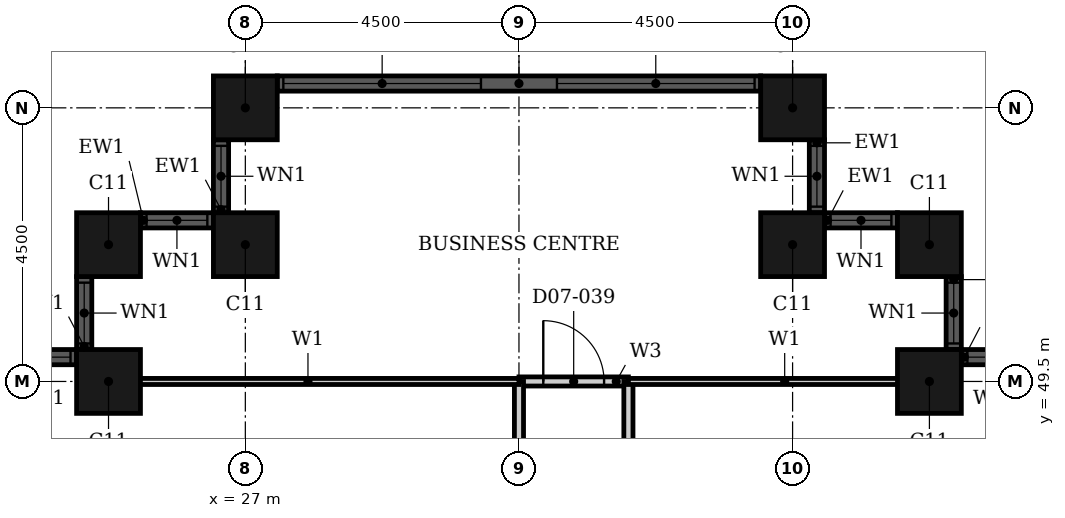
"""IFC4 building model, lengths in metres.
Left out: names, types, materials, properties, quantities, classifications, styles, units other than length and angle.
Written with IfcOpenShell. Run it as: python <this file> out.ifc"""

import sys

from ifc_helpers import new_model, si_unit, direction, frame, frame_2d, origin, origin_2d, place, context, subcontext, project, spatial, rectangle, hollow_rectangle, extrude, element, fill, save


model = new_model("IFC4")
c1 = context("Model", 3, precision=1e-05, world=origin(), true_north=direction((0.0, 1.0)))
c2 = subcontext(c1, "Body", "Model", "MODEL_VIEW")
j1 = project(units=[si_unit("LENGTHUNIT", "METRE"), si_unit("PLANEANGLEUNIT", "RADIAN")], contexts=[c1])
p1 = place(None, origin())
s1 = spatial("IfcSite", under=j1, at=p1, CompositionType="ELEMENT")
p2 = place(p1, origin())
s2 = spatial("IfcBuilding", under=s1, at=p2, CompositionType="ELEMENT")
p3 = place(p2, frame((0.0, 0.0, 37.2)))
s3 = spatial("IfcBuildingStorey", under=s2, at=p3, CompositionType="ELEMENT", Elevation=37.2)
for number, where, z_axis, x_axis in (
    (1, (38.25, 49.5, 0.0), (0.0, 0.0, 1.0), (1.0, 0.0, 0.0)),
    (2, (38.25, 51.75, 0.0), (0.0, 0.0, 1.0), (1.0, 0.0, 0.0)),
    (3, (36.0, 51.75, 0.0), (0.0, 0.0, 1.0), (1.0, 0.0, 0.0)),
    (4, (36.0, 54.0, 0.0), (0.0, 0.0, 1.0), (1.0, 0.0, 0.0)),
    (5, (27.0, 54.0, 0.0), (0.0, 0.0, 1.0), (1.0, 0.0, 0.0)),
    (6, (27.0, 51.75, 0.0), (0.0, 0.0, 1.0), (1.0, 0.0, 0.0)),
    (7, (24.75, 51.75, 0.0), (0.0, 0.0, 1.0), (1.0, 0.0, 0.0)),
    (8, (24.75, 49.5, 0.0), (0.0, 0.0, 1.0), (1.0, 0.0, 0.0)),
):
    element("IfcColumn", number, at=place(p3, frame(where, z_axis=z_axis, x_axis=x_axis)), inside=s3, PredefinedType="COLUMN", context=c2, shape_type="SweptSolid", body=[
        extrude(hollow_rectangle(XDim=1.05, YDim=1.05, WallThickness=0.034, at=origin_2d()), origin(), (0.0, 0.0, 1.0), 3.6),
    ])
p4 = place(p3, frame((39.975, 49.9, 0.0), z_axis=(0.0, 0.0, 1.0), x_axis=(-1.0, 0.0, 0.0)))
e9 = element("IfcWall", 9, at=p4, inside=s3, PredefinedType="SOLIDWALL", context=c2, shape_type="SweptSolid", body=[
    extrude(rectangle(XDim=1.2, YDim=0.25, at=frame_2d((0.6, 0.0))), origin(), (0.0, 0.0, 1.0), 3.6),
])
p5 = place(p4, frame((0.1, 0.0, 0.9)))
e10 = element("IfcOpeningElement", 10, at=p5, cuts=e9, PredefinedType="OPENING", context=c2, shape_type="SweptSolid", body=[
    extrude(rectangle(XDim=1.0, YDim=2.08, at=frame_2d((0.5, 1.04))), frame((0.0, 0.135, 0.0), z_axis=(0.0, -1.0, 0.0), x_axis=(1.0, 0.0, 0.0)), (0.0, 0.0, 1.0), 0.27),
])
p6 = place(p3, frame((38.65, 50.025, 0.0), z_axis=(0.0, 0.0, 1.0), x_axis=(0.0, 1.0, 0.0)))
e11 = element("IfcWall", 11, at=p6, inside=s3, PredefinedType="SOLIDWALL", context=c2, shape_type="SweptSolid", body=[
    extrude(rectangle(XDim=1.2, YDim=0.25, at=frame_2d((0.6, 0.0))), origin(), (0.0, 0.0, 1.0), 3.6),
])
p7 = place(p6, frame((0.1, 0.0, 0.9)))
e12 = element("IfcOpeningElement", 12, at=p7, cuts=e11, PredefinedType="OPENING", context=c2, shape_type="SweptSolid", body=[
    extrude(rectangle(XDim=1.0, YDim=2.08, at=frame_2d((0.5, 1.04))), frame((0.0, 0.135, 0.0), z_axis=(0.0, -1.0, 0.0), x_axis=(1.0, 0.0, 0.0)), (0.0, 0.0, 1.0), 0.27),
])
p8 = place(p3, frame((37.725, 52.15, 0.0), z_axis=(0.0, 0.0, 1.0), x_axis=(-1.0, 0.0, 0.0)))
e13 = element("IfcWall", 13, at=p8, inside=s3, PredefinedType="SOLIDWALL", context=c2, shape_type="SweptSolid", body=[
    extrude(rectangle(XDim=1.2, YDim=0.25, at=frame_2d((0.6, 0.0))), origin(), (0.0, 0.0, 1.0), 3.6),
])
p9 = place(p8, frame((0.1, 0.0, 0.9)))
e14 = element("IfcOpeningElement", 14, at=p9, cuts=e13, PredefinedType="OPENING", context=c2, shape_type="SweptSolid", body=[
    extrude(rectangle(XDim=1.0, YDim=2.08, at=frame_2d((0.5, 1.04))), frame((0.0, 0.135, 0.0), z_axis=(0.0, -1.0, 0.0), x_axis=(1.0, 0.0, 0.0)), (0.0, 0.0, 1.0), 0.27),
])
p10 = place(p3, frame((36.4, 52.275, 0.0), z_axis=(0.0, 0.0, 1.0), x_axis=(0.0, 1.0, 0.0)))
e15 = element("IfcWall", 15, at=p10, inside=s3, PredefinedType="SOLIDWALL", context=c2, shape_type="SweptSolid", body=[
    extrude(rectangle(XDim=1.2, YDim=0.25, at=frame_2d((0.6, 0.0))), origin(), (0.0, 0.0, 1.0), 3.6),
])
p11 = place(p10, frame((0.1, 0.0, 0.9)))
e16 = element("IfcOpeningElement", 16, at=p11, cuts=e15, PredefinedType="OPENING", context=c2, shape_type="SweptSolid", body=[
    extrude(rectangle(XDim=1.0, YDim=2.08, at=frame_2d((0.5, 1.04))), frame((0.0, 0.135, 0.0), z_axis=(0.0, -1.0, 0.0), x_axis=(1.0, 0.0, 0.0)), (0.0, 0.0, 1.0), 0.27),
])
p12 = place(p3, frame((35.475, 54.4, 0.0), z_axis=(0.0, 0.0, 1.0), x_axis=(-1.0, 0.0, 0.0)))
e17 = element("IfcWall", 17, at=p12, inside=s3, PredefinedType="SOLIDWALL", context=c2, shape_type="SweptSolid", body=[
    extrude(rectangle(XDim=7.95, YDim=0.25, at=frame_2d((3.975, 0.0))), origin(), (0.0, 0.0, 1.0), 3.6),
])
p13 = place(p12, frame((0.1, 0.0, 0.9)))
e18 = element("IfcOpeningElement", 18, at=p13, cuts=e17, PredefinedType="OPENING", context=c2, shape_type="SweptSolid", body=[
    extrude(rectangle(XDim=3.25, YDim=2.08, at=frame_2d((1.625, 1.04))), frame((0.0, 0.135, 0.0), z_axis=(0.0, -1.0, 0.0), x_axis=(1.0, 0.0, 0.0)), (0.0, 0.0, 1.0), 0.27),
])
p14 = place(p12, frame((4.6, 0.0, 0.9)))
e19 = element("IfcOpeningElement", 19, at=p14, cuts=e17, PredefinedType="OPENING", context=c2, shape_type="SweptSolid", body=[
    extrude(rectangle(XDim=3.25, YDim=2.08, at=frame_2d((1.625, 1.04))), frame((0.0, 0.135, 0.0), z_axis=(0.0, -1.0, 0.0), x_axis=(1.0, 0.0, 0.0)), (0.0, 0.0, 1.0), 0.27),
])
p15 = place(p3, frame((26.6, 53.475, 0.0), z_axis=(0.0, 0.0, 1.0), x_axis=(0.0, -1.0, 0.0)))
e20 = element("IfcWall", 20, at=p15, inside=s3, PredefinedType="SOLIDWALL", context=c2, shape_type="SweptSolid", body=[
    extrude(rectangle(XDim=1.2, YDim=0.25, at=frame_2d((0.6, 0.0))), origin(), (0.0, 0.0, 1.0), 3.6),
])
p16 = place(p15, frame((0.1, 0.0, 0.9)))
e21 = element("IfcOpeningElement", 21, at=p16, cuts=e20, PredefinedType="OPENING", context=c2, shape_type="SweptSolid", body=[
    extrude(rectangle(XDim=1.0, YDim=2.08, at=frame_2d((0.5, 1.04))), frame((0.0, 0.135, 0.0), z_axis=(0.0, -1.0, 0.0), x_axis=(1.0, 0.0, 0.0)), (0.0, 0.0, 1.0), 0.27),
])
p17 = place(p3, frame((26.475, 52.15, 0.0), z_axis=(0.0, 0.0, 1.0), x_axis=(-1.0, 0.0, 0.0)))
e22 = element("IfcWall", 22, at=p17, inside=s3, PredefinedType="SOLIDWALL", context=c2, shape_type="SweptSolid", body=[
    extrude(rectangle(XDim=1.2, YDim=0.25, at=frame_2d((0.6, 0.0))), origin(), (0.0, 0.0, 1.0), 3.6),
])
p18 = place(p17, frame((0.1, 0.0, 0.9)))
e23 = element("IfcOpeningElement", 23, at=p18, cuts=e22, PredefinedType="OPENING", context=c2, shape_type="SweptSolid", body=[
    extrude(rectangle(XDim=1.0, YDim=2.08, at=frame_2d((0.5, 1.04))), frame((0.0, 0.135, 0.0), z_axis=(0.0, -1.0, 0.0), x_axis=(1.0, 0.0, 0.0)), (0.0, 0.0, 1.0), 0.27),
])
p19 = place(p3, frame((24.35, 51.225, 0.0), z_axis=(0.0, 0.0, 1.0), x_axis=(0.0, -1.0, 0.0)))
e24 = element("IfcWall", 24, at=p19, inside=s3, PredefinedType="SOLIDWALL", context=c2, shape_type="SweptSolid", body=[
    extrude(rectangle(XDim=1.2, YDim=0.25, at=frame_2d((0.6, 0.0))), origin(), (0.0, 0.0, 1.0), 3.6),
])
p20 = place(p19, frame((0.1, 0.0, 0.9)))
e25 = element("IfcOpeningElement", 25, at=p20, cuts=e24, PredefinedType="OPENING", context=c2, shape_type="SweptSolid", body=[
    extrude(rectangle(XDim=1.0, YDim=2.08, at=frame_2d((0.5, 1.04))), frame((0.0, 0.135, 0.0), z_axis=(0.0, -1.0, 0.0), x_axis=(1.0, 0.0, 0.0)), (0.0, 0.0, 1.0), 0.27),
])
p21 = place(p3, frame((24.225, 49.9, 0.0), z_axis=(0.0, 0.0, 1.0), x_axis=(-1.0, 0.0, 0.0)))
e26 = element("IfcWall", 26, at=p21, inside=s3, PredefinedType="SOLIDWALL", context=c2, shape_type="SweptSolid", body=[
    extrude(rectangle(XDim=1.2, YDim=0.25, at=frame_2d((0.6, 0.0))), origin(), (0.0, 0.0, 1.0), 3.6),
])
p22 = place(p21, frame((0.1, 0.0, 0.9)))
e27 = element("IfcOpeningElement", 27, at=p22, cuts=e26, PredefinedType="OPENING", context=c2, shape_type="SweptSolid", body=[
    extrude(rectangle(XDim=1.0, YDim=2.08, at=frame_2d((0.5, 1.04))), frame((0.0, 0.135, 0.0), z_axis=(0.0, -1.0, 0.0), x_axis=(1.0, 0.0, 0.0)), (0.0, 0.0, 1.0), 0.27),
])
p23 = place(p3, frame((31.5, 49.5, 0.0), z_axis=(0.0, 0.0, 1.0), x_axis=(1.0, 0.0, 0.0)))
e28 = element("IfcWall", 28, at=p23, inside=s3, PredefinedType="PARTITIONING", context=c2, shape_type="SweptSolid", body=[
    extrude(rectangle(XDim=1.8, YDim=0.15, at=frame_2d((0.9, 0.0))), origin(), (0.0, 0.0, 1.0), 3.3),
])
p24 = place(p23, frame((0.4, 0.0, 0.0)))
e29 = element("IfcOpeningElement", 29, at=p24, cuts=e28, PredefinedType="OPENING", context=c2, shape_type="SweptSolid", body=[
    extrude(rectangle(XDim=1.0, YDim=2.1, at=frame_2d((0.5, 1.05))), frame((0.0, 0.085, 0.0), z_axis=(0.0, -1.0, 0.0), x_axis=(1.0, 0.0, 0.0)), (0.0, 0.0, 1.0), 0.17),
])
p25 = place(p3, frame((31.5, 33.3, 0.0), z_axis=(0.0, 0.0, 1.0), x_axis=(0.0, 1.0, 0.0)))
e30 = element("IfcWall", 30, at=p25, inside=s3, PredefinedType="PARTITIONING", context=c2, shape_type="SweptSolid", body=[
    extrude(rectangle(XDim=16.2, YDim=0.15, at=frame_2d((8.1, 0.0))), origin(), (0.0, 0.0, 1.0), 2.58),
])
p26 = place(p25, frame((8.95, 0.0, 0.0)))
e31 = element("IfcOpeningElement", 31, at=p26, cuts=e30, PredefinedType="OPENING", context=c2, shape_type="SweptSolid", body=[
    extrude(rectangle(XDim=1.0, YDim=2.1, at=frame_2d((0.5, 1.05))), frame((0.0, 0.085, 0.0), z_axis=(0.0, -1.0, 0.0), x_axis=(1.0, 0.0, 0.0)), (0.0, 0.0, 1.0), 0.17),
])
p27 = place(p3, frame((33.3, 33.3, 0.0), z_axis=(0.0, 0.0, 1.0), x_axis=(0.0, 1.0, 0.0)))
e32 = element("IfcWall", 32, at=p27, inside=s3, PredefinedType="PARTITIONING", context=c2, shape_type="SweptSolid", body=[
    extrude(rectangle(XDim=16.2, YDim=0.15, at=frame_2d((8.1, 0.0))), origin(), (0.0, 0.0, 1.0), 3.3),
])
p28 = place(p27, frame((8.95, 0.0, 0.0)))
e33 = element("IfcOpeningElement", 33, at=p28, cuts=e32, PredefinedType="OPENING", context=c2, shape_type="SweptSolid", body=[
    extrude(rectangle(XDim=1.0, YDim=2.1, at=frame_2d((0.5, 1.05))), frame((0.0, 0.085, 0.0), z_axis=(0.0, -1.0, 0.0), x_axis=(1.0, 0.0, 0.0)), (0.0, 0.0, 1.0), 0.17),
])
p29 = place(p3, frame((33.3, 49.5, 0.0), z_axis=(0.0, 0.0, 1.0), x_axis=(1.0, 0.0, 0.0)))
e34 = element("IfcWall", 34, at=p29, inside=s3, PredefinedType="PARTITIONING", context=c2, shape_type="SweptSolid", body=[
    extrude(rectangle(XDim=5.14, YDim=0.1, at=frame_2d((2.57, 0.0))), origin(), (0.0, 0.0, 1.0), 3.3),
])
p30 = place(p3, frame((24.56, 49.5, 0.0), z_axis=(0.0, 0.0, 1.0), x_axis=(1.0, 0.0, 0.0)))
e35 = element("IfcWall", 35, at=p30, inside=s3, PredefinedType="PARTITIONING", context=c2, shape_type="SweptSolid", body=[
    extrude(rectangle(XDim=6.94, YDim=0.1, at=frame_2d((3.47, 0.0))), origin(), (0.0, 0.0, 1.0), 3.3),
])
p31 = place(p5, origin())
e36 = element("IfcWindow", 36, at=p31, inside=s3, PartitioningType="SINGLE_PANEL", PredefinedType="WINDOW", context=c2, shape_type="SweptSolid", body=[
    extrude(rectangle(XDim=1.0, YDim=2.08, at=frame_2d((0.5, 1.04))), frame((0.0, 0.03, 0.0), z_axis=(0.0, -1.0, 0.0), x_axis=(1.0, 0.0, 0.0)), (0.0, 0.0, 1.0), 0.06),
])
fill(e10, e36)
p32 = place(p7, origin())
e37 = element("IfcWindow", 37, at=p32, inside=s3, PartitioningType="SINGLE_PANEL", PredefinedType="WINDOW", context=c2, shape_type="SweptSolid", body=[
    extrude(rectangle(XDim=1.0, YDim=2.08, at=frame_2d((0.5, 1.04))), frame((0.0, 0.03, 0.0), z_axis=(0.0, -1.0, 0.0), x_axis=(1.0, 0.0, 0.0)), (0.0, 0.0, 1.0), 0.06),
])
fill(e12, e37)
p33 = place(p9, origin())
e38 = element("IfcWindow", 38, at=p33, inside=s3, PartitioningType="SINGLE_PANEL", PredefinedType="WINDOW", context=c2, shape_type="SweptSolid", body=[
    extrude(rectangle(XDim=1.0, YDim=2.08, at=frame_2d((0.5, 1.04))), frame((0.0, 0.03, 0.0), z_axis=(0.0, -1.0, 0.0), x_axis=(1.0, 0.0, 0.0)), (0.0, 0.0, 1.0), 0.06),
])
fill(e14, e38)
p34 = place(p11, origin())
e39 = element("IfcWindow", 39, at=p34, inside=s3, PartitioningType="SINGLE_PANEL", PredefinedType="WINDOW", context=c2, shape_type="SweptSolid", body=[
    extrude(rectangle(XDim=1.0, YDim=2.08, at=frame_2d((0.5, 1.04))), frame((0.0, 0.03, 0.0), z_axis=(0.0, -1.0, 0.0), x_axis=(1.0, 0.0, 0.0)), (0.0, 0.0, 1.0), 0.06),
])
fill(e16, e39)
p35 = place(p13, origin())
e40 = element("IfcWindow", 40, at=p35, inside=s3, PartitioningType="SINGLE_PANEL", PredefinedType="WINDOW", context=c2, shape_type="SweptSolid", body=[
    extrude(rectangle(XDim=3.25, YDim=2.08, at=frame_2d((1.625, 1.04))), frame((0.0, 0.03, 0.0), z_axis=(0.0, -1.0, 0.0), x_axis=(1.0, 0.0, 0.0)), (0.0, 0.0, 1.0), 0.06),
])
fill(e18, e40)
p36 = place(p14, origin())
e41 = element("IfcWindow", 41, at=p36, inside=s3, PartitioningType="SINGLE_PANEL", PredefinedType="WINDOW", context=c2, shape_type="SweptSolid", body=[
    extrude(rectangle(XDim=3.25, YDim=2.08, at=frame_2d((1.625, 1.04))), frame((0.0, 0.03, 0.0), z_axis=(0.0, -1.0, 0.0), x_axis=(1.0, 0.0, 0.0)), (0.0, 0.0, 1.0), 0.06),
])
fill(e19, e41)
p37 = place(p16, origin())
e42 = element("IfcWindow", 42, at=p37, inside=s3, PartitioningType="SINGLE_PANEL", PredefinedType="WINDOW", context=c2, shape_type="SweptSolid", body=[
    extrude(rectangle(XDim=1.0, YDim=2.08, at=frame_2d((0.5, 1.04))), frame((0.0, 0.03, 0.0), z_axis=(0.0, -1.0, 0.0), x_axis=(1.0, 0.0, 0.0)), (0.0, 0.0, 1.0), 0.06),
])
fill(e21, e42)
p38 = place(p18, origin())
e43 = element("IfcWindow", 43, at=p38, inside=s3, PartitioningType="SINGLE_PANEL", PredefinedType="WINDOW", context=c2, shape_type="SweptSolid", body=[
    extrude(rectangle(XDim=1.0, YDim=2.08, at=frame_2d((0.5, 1.04))), frame((0.0, 0.03, 0.0), z_axis=(0.0, -1.0, 0.0), x_axis=(1.0, 0.0, 0.0)), (0.0, 0.0, 1.0), 0.06),
])
fill(e23, e43)
p39 = place(p20, origin())
e44 = element("IfcWindow", 44, at=p39, inside=s3, PartitioningType="SINGLE_PANEL", PredefinedType="WINDOW", context=c2, shape_type="SweptSolid", body=[
    extrude(rectangle(XDim=1.0, YDim=2.08, at=frame_2d((0.5, 1.04))), frame((0.0, 0.03, 0.0), z_axis=(0.0, -1.0, 0.0), x_axis=(1.0, 0.0, 0.0)), (0.0, 0.0, 1.0), 0.06),
])
fill(e25, e44)
p40 = place(p22, origin())
e45 = element("IfcWindow", 45, at=p40, inside=s3, PartitioningType="SINGLE_PANEL", PredefinedType="WINDOW", context=c2, shape_type="SweptSolid", body=[
    extrude(rectangle(XDim=1.0, YDim=2.08, at=frame_2d((0.5, 1.04))), frame((0.0, 0.03, 0.0), z_axis=(0.0, -1.0, 0.0), x_axis=(1.0, 0.0, 0.0)), (0.0, 0.0, 1.0), 0.06),
])
fill(e27, e45)
p41 = place(p24, origin())
e46 = element("IfcDoor", 46, at=p41, inside=s3, OperationType="SINGLE_SWING_RIGHT", PredefinedType="DOOR", context=c2, shape_type="SweptSolid", body=[
    extrude(rectangle(XDim=1.0, YDim=2.1, at=frame_2d((0.5, 1.05))), frame((0.0, 0.025, 0.0), z_axis=(0.0, -1.0, 0.0), x_axis=(1.0, 0.0, 0.0)), (0.0, 0.0, 1.0), 0.05),
])
fill(e29, e46)
save(model, sys.argv[1])
